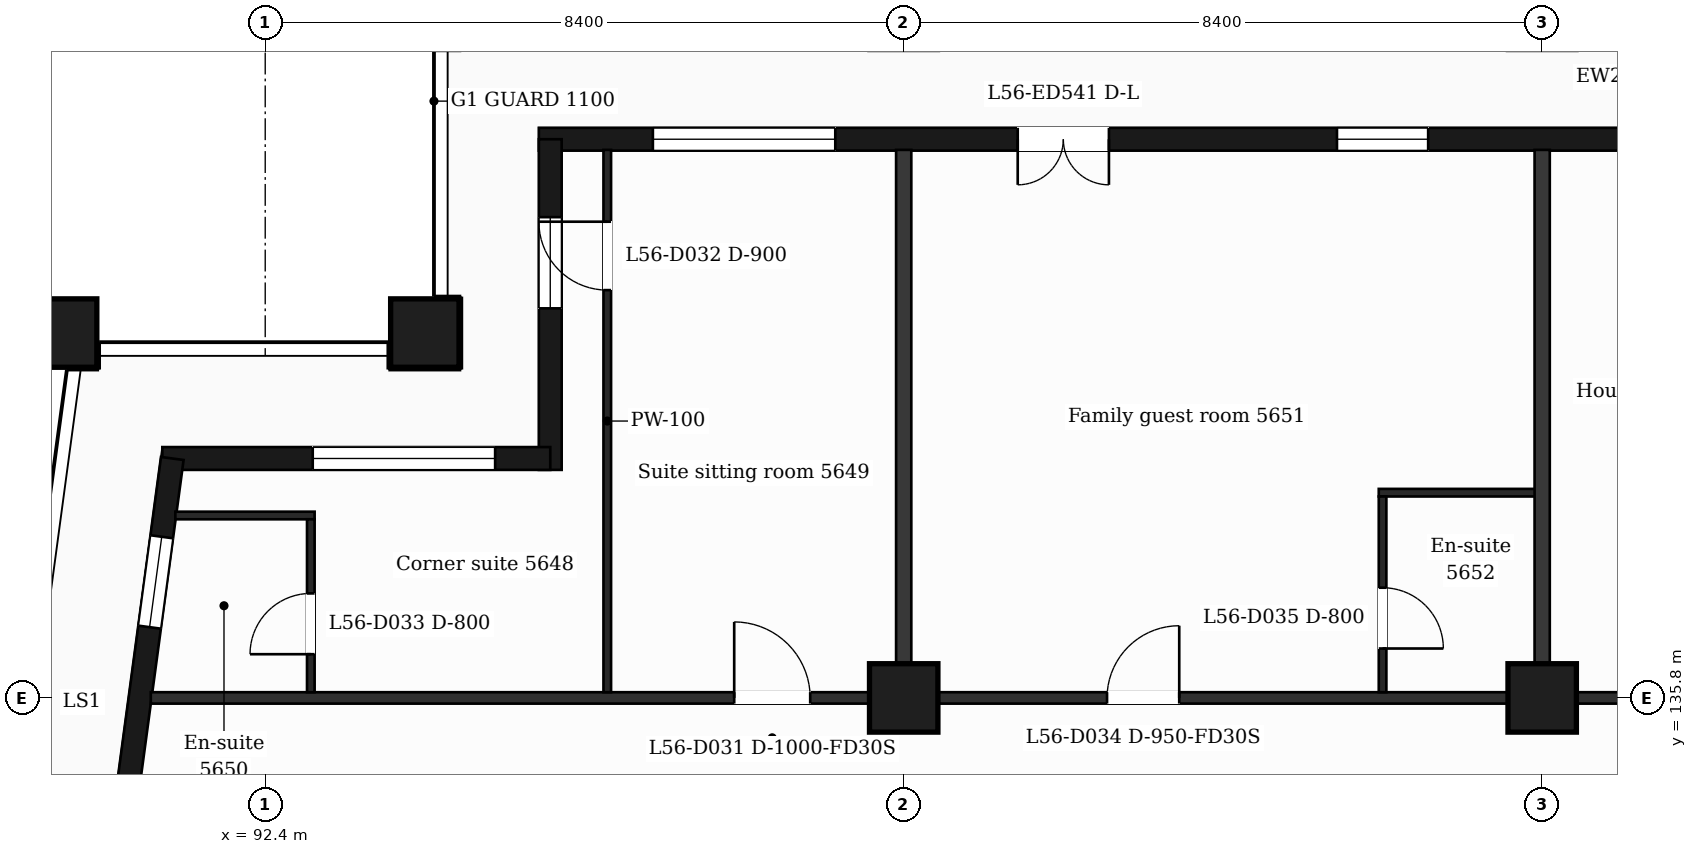
"""IFC4 building model, lengths in metres.
Left out: names, types, materials, properties, quantities, classifications, styles, units other than length and angle.
Written with IfcOpenShell. Run it as: python <this file> out.ifc"""

import sys

from ifc_helpers import new_model, si_unit, direction, frame, frame_2d, origin, origin_2d, place, context, subcontext, project, spatial, rectangle, extrude, element, fill, save


model = new_model("IFC4")
c1 = context("Model", 3, precision=1e-05, world=origin(), true_north=direction((0.0, 1.0)))
c2 = subcontext(c1, "Body", "Model", "MODEL_VIEW")
j1 = project(units=[si_unit("LENGTHUNIT", "METRE"), si_unit("PLANEANGLEUNIT", "RADIAN")], contexts=[c1])
p1 = place(None, origin())
s1 = spatial("IfcSite", under=j1, at=p1, CompositionType="ELEMENT")
p2 = place(p1, origin())
s2 = spatial("IfcBuilding", under=s1, at=p2, CompositionType="ELEMENT")
p3 = place(p2, frame((0.0, 0.0, 231.8)))
s3 = spatial("IfcBuildingStorey", under=s2, at=p3, CompositionType="ELEMENT", Elevation=231.8)
for number, where, z_axis, x_axis in (
    (1, (94.5, 140.6, 0.0), (0.0, 0.0, 1.0), (1.0, 0.0, 0.0)),
    (2, (89.735, 140.6, 0.0), (0.0, 0.0, 1.0), (1.0, 0.0, 0.0)),
    (3, (100.8, 135.8, 0.0), (0.0, 0.0, 1.0), (1.0, 0.0, 0.0)),
    (4, (109.2, 135.8, 0.0), (0.0, 0.0, 1.0), (1.0, 0.0, 0.0)),
):
    element("IfcColumn", number, at=place(p3, frame(where, z_axis=z_axis, x_axis=x_axis)), inside=s3, PredefinedType="COLUMN", context=c2, shape_type="SweptSolid", body=[
        extrude(rectangle(XDim=0.9, YDim=0.9, at=origin_2d()), origin(), (0.0, 0.0, 1.0), 3.7),
    ])
p4 = place(p3, frame((110.4, 143.15, 0.0), z_axis=(0.0, 0.0, 1.0), x_axis=(-1.0, 0.0, 0.0)))
e5 = element("IfcWall", 5, at=p4, inside=s3, PredefinedType="SOLIDWALL", context=c2, shape_type="SweptSolid", body=[
    extrude(rectangle(XDim=14.4, YDim=0.3, at=frame_2d((7.2, 0.0))), origin(), (0.0, 0.0, 1.0), 3.38),
])
p5 = place(p4, frame((2.7, 0.0, 0.9)))
e6 = element("IfcOpeningElement", 6, at=p5, cuts=e5, PredefinedType="OPENING", context=c2, shape_type="SweptSolid", body=[
    extrude(rectangle(XDim=1.2, YDim=2.1, at=frame_2d((0.6, 1.05))), frame((0.0, 0.16, 0.0), z_axis=(0.0, -1.0, 0.0), x_axis=(1.0, 0.0, 0.0)), (0.0, 0.0, 1.0), 0.32),
])
p6 = place(p4, frame((6.9, 0.0, 0.0)))
e7 = element("IfcOpeningElement", 7, at=p6, cuts=e5, PredefinedType="OPENING", context=c2, shape_type="SweptSolid", body=[
    extrude(rectangle(XDim=1.2, YDim=2.4, at=frame_2d((0.6, 1.2))), frame((0.0, 0.16, 0.0), z_axis=(0.0, -1.0, 0.0), x_axis=(1.0, 0.0, 0.0)), (0.0, 0.0, 1.0), 0.32),
])
p7 = place(p4, frame((10.5, 0.0, 0.9)))
e8 = element("IfcOpeningElement", 8, at=p7, cuts=e5, PredefinedType="OPENING", context=c2, shape_type="SweptSolid", body=[
    extrude(rectangle(XDim=2.4, YDim=2.1, at=frame_2d((1.2, 1.05))), frame((0.0, 0.16, 0.0), z_axis=(0.0, -1.0, 0.0), x_axis=(1.0, 0.0, 0.0)), (0.0, 0.0, 1.0), 0.32),
])
p8 = place(p3, frame((96.15, 143.15, 0.0), z_axis=(0.0, 0.0, 1.0), x_axis=(0.0, -1.0, 0.0)))
e9 = element("IfcWall", 9, at=p8, inside=s3, PredefinedType="SOLIDWALL", context=c2, shape_type="SweptSolid", body=[
    extrude(rectangle(XDim=4.35, YDim=0.3, at=frame_2d((2.175, 0.0))), origin(), (0.0, 0.0, 1.0), 3.38),
])
p9 = place(p8, frame((1.025, 0.0, 0.9)))
e10 = element("IfcOpeningElement", 10, at=p9, cuts=e9, PredefinedType="OPENING", context=c2, shape_type="SweptSolid", body=[
    extrude(rectangle(XDim=1.2, YDim=2.1, at=frame_2d((0.6, 1.05))), frame((0.0, 0.16, 0.0), z_axis=(0.0, -1.0, 0.0), x_axis=(1.0, 0.0, 0.0)), (0.0, 0.0, 1.0), 0.32),
])
p10 = place(p3, frame((96.15, 138.95, 0.0), z_axis=(0.0, 0.0, 1.0), x_axis=(-1.0, 0.0, 0.0)))
e11 = element("IfcWall", 11, at=p10, inside=s3, PredefinedType="SOLIDWALL", context=c2, shape_type="SweptSolid", body=[
    extrude(rectangle(XDim=5.104, YDim=0.3, at=frame_2d((2.552, 0.0))), origin(), (0.0, 0.0, 1.0), 3.38),
])
p11 = place(p10, frame((0.725, 0.0, 0.9)))
e12 = element("IfcOpeningElement", 12, at=p11, cuts=e11, PredefinedType="OPENING", context=c2, shape_type="SweptSolid", body=[
    extrude(rectangle(XDim=2.4, YDim=2.1, at=frame_2d((1.2, 1.05))), frame((0.0, 0.16, 0.0), z_axis=(0.0, -1.0, 0.0), x_axis=(1.0, 0.0, 0.0)), (0.0, 0.0, 1.0), 0.32),
])
p12 = place(p3, frame((91.177, 138.95, 0.0), z_axis=(0.0, 0.0, 1.0), x_axis=(-0.133426664613, -0.991058689065, 0.0)))
e13 = element("IfcWall", 13, at=p12, inside=s3, PredefinedType="SOLIDWALL", context=c2, shape_type="SweptSolid", body=[
    extrude(rectangle(XDim=6.609, YDim=0.3, at=frame_2d((3.305, 0.0))), origin(), (0.0, 0.0, 1.0), 3.38),
])
p13 = place(p12, frame((1.039, 0.0, 0.9)))
e14 = element("IfcOpeningElement", 14, at=p13, cuts=e13, PredefinedType="OPENING", context=c2, shape_type="SweptSolid", body=[
    extrude(rectangle(XDim=1.2, YDim=2.1, at=frame_2d((0.6, 1.05))), frame((0.0, 0.16, 0.0), z_axis=(0.0, -1.0, 0.0), x_axis=(1.0, 0.0, 0.0)), (0.0, 0.0, 1.0), 0.32),
])
p14 = place(p12, frame((4.294, 0.0, 0.0)))
e15 = element("IfcOpeningElement", 15, at=p14, cuts=e13, PredefinedType="OPENING", context=c2, shape_type="SweptSolid", body=[
    extrude(rectangle(XDim=1.2, YDim=2.4, at=frame_2d((0.6, 1.2))), frame((0.0, 0.16, 0.0), z_axis=(0.0, -1.0, 0.0), x_axis=(1.0, 0.0, 0.0)), (0.0, 0.0, 1.0), 0.32),
])
p15 = place(p3, frame((90.895, 135.8, 0.0), z_axis=(0.0, 0.0, 1.0), x_axis=(1.0, 0.0, 0.0)))
e16 = element("IfcWall", 16, at=p15, inside=s3, PredefinedType="PARTITIONING", context=c2, shape_type="SweptSolid", body=[
    extrude(rectangle(XDim=45.011, YDim=0.15, at=frame_2d((22.505, 0.0))), origin(), (0.0, 0.0, 1.0), 3.38),
])
p16 = place(p15, frame((7.675, 0.0, 0.0)))
e17 = element("IfcOpeningElement", 17, at=p16, cuts=e16, PredefinedType="OPENING", context=c2, shape_type="SweptSolid", body=[
    extrude(rectangle(XDim=1.0, YDim=2.1, at=frame_2d((0.5, 1.05))), frame((0.0, 0.085, 0.0), z_axis=(0.0, -1.0, 0.0), x_axis=(1.0, 0.0, 0.0)), (0.0, 0.0, 1.0), 0.17),
])
p17 = place(p15, frame((12.58, 0.0, 0.0)))
e18 = element("IfcOpeningElement", 18, at=p17, cuts=e16, PredefinedType="OPENING", context=c2, shape_type="SweptSolid", body=[
    extrude(rectangle(XDim=0.95, YDim=2.1, at=frame_2d((0.475, 1.05))), frame((0.0, 0.085, 0.0), z_axis=(0.0, -1.0, 0.0), x_axis=(1.0, 0.0, 0.0)), (0.0, 0.0, 1.0), 0.17),
])
p18 = place(p15, frame((20.568, 0.0, 0.0)))
e19 = element("IfcOpeningElement", 19, at=p18, cuts=e16, PredefinedType="OPENING", context=c2, shape_type="SweptSolid", body=[
    extrude(rectangle(XDim=0.95, YDim=2.1, at=frame_2d((0.475, 1.05))), frame((0.0, 0.085, 0.0), z_axis=(0.0, -1.0, 0.0), x_axis=(1.0, 0.0, 0.0)), (0.0, 0.0, 1.0), 0.17),
])
p19 = place(p15, frame((24.865, 0.0, 0.0)))
e20 = element("IfcOpeningElement", 20, at=p19, cuts=e16, PredefinedType="OPENING", context=c2, shape_type="SweptSolid", body=[
    extrude(rectangle(XDim=1.0, YDim=2.1, at=frame_2d((0.5, 1.05))), frame((0.0, 0.085, 0.0), z_axis=(0.0, -1.0, 0.0), x_axis=(1.0, 0.0, 0.0)), (0.0, 0.0, 1.0), 0.17),
])
p20 = place(p15, frame((39.814, 0.0, 0.0)))
e21 = element("IfcOpeningElement", 21, at=p20, cuts=e16, PredefinedType="OPENING", context=c2, shape_type="SweptSolid", body=[
    extrude(rectangle(XDim=0.95, YDim=2.1, at=frame_2d((0.475, 1.05))), frame((0.0, 0.085, 0.0), z_axis=(0.0, -1.0, 0.0), x_axis=(1.0, 0.0, 0.0)), (0.0, 0.0, 1.0), 0.17),
])
p21 = place(p3, frame((91.218, 138.2, 0.0), z_axis=(0.0, 0.0, 1.0), x_axis=(1.0, 0.0, 0.0)))
e22 = element("IfcWall", 22, at=p21, inside=s3, PredefinedType="PARTITIONING", context=c2, shape_type="SweptSolid", body=[
    extrude(rectangle(XDim=1.832, YDim=0.1, at=frame_2d((0.916, 0.0))), origin(), (0.0, 0.0, 1.0), 3.38),
])
p22 = place(p3, frame((107.05, 138.5, 0.0), z_axis=(0.0, 0.0, 1.0), x_axis=(1.0, 0.0, 0.0)))
e23 = element("IfcWall", 23, at=p22, inside=s3, PredefinedType="PARTITIONING", context=c2, shape_type="SweptSolid", body=[
    extrude(rectangle(XDim=2.15, YDim=0.1, at=frame_2d((1.075, 0.0))), origin(), (0.0, 0.0, 1.0), 3.38),
])
p23 = place(p3, frame((93.0, 135.875, 0.0), z_axis=(0.0, 0.0, 1.0), x_axis=(0.0, 1.0, 0.0)))
e24 = element("IfcWall", 24, at=p23, inside=s3, PredefinedType="PARTITIONING", context=c2, shape_type="SweptSolid", body=[
    extrude(rectangle(XDim=2.275, YDim=0.1, at=frame_2d((1.137, 0.0))), origin(), (0.0, 0.0, 1.0), 3.38),
])
p24 = place(p23, frame((0.5, 0.0, 0.0)))
e25 = element("IfcOpeningElement", 25, at=p24, cuts=e24, PredefinedType="OPENING", context=c2, shape_type="SweptSolid", body=[
    extrude(rectangle(XDim=0.8, YDim=2.1, at=frame_2d((0.4, 1.05))), frame((0.0, 0.06, 0.0), z_axis=(0.0, -1.0, 0.0), x_axis=(1.0, 0.0, 0.0)), (0.0, 0.0, 1.0), 0.12),
])
p25 = place(p3, frame((96.9, 135.875, 0.0), z_axis=(0.0, 0.0, 1.0), x_axis=(0.0, 1.0, 0.0)))
e26 = element("IfcWall", 26, at=p25, inside=s3, PredefinedType="PARTITIONING", context=c2, shape_type="SweptSolid", body=[
    extrude(rectangle(XDim=7.135, YDim=0.1, at=frame_2d((3.567, 0.0))), origin(), (0.0, 0.0, 1.0), 3.38),
])
p26 = place(p25, frame((5.29, 0.0, 0.0)))
e27 = element("IfcOpeningElement", 27, at=p26, cuts=e26, PredefinedType="OPENING", context=c2, shape_type="SweptSolid", body=[
    extrude(rectangle(XDim=0.9, YDim=2.1, at=frame_2d((0.45, 1.05))), frame((0.0, 0.06, 0.0), z_axis=(0.0, -1.0, 0.0), x_axis=(1.0, 0.0, 0.0)), (0.0, 0.0, 1.0), 0.12),
])
p27 = place(p3, frame((100.8, 135.875, 0.0), z_axis=(0.0, 0.0, 1.0), x_axis=(0.0, 1.0, 0.0)))
e28 = element("IfcWall", 28, at=p27, inside=s3, PredefinedType="PARTITIONING", context=c2, shape_type="SweptSolid", body=[
    extrude(rectangle(XDim=7.135, YDim=0.2, at=frame_2d((3.567, 0.0))), origin(), (0.0, 0.0, 1.0), 3.38),
])
p28 = place(p3, frame((107.1, 135.875, 0.0), z_axis=(0.0, 0.0, 1.0), x_axis=(0.0, 1.0, 0.0)))
e29 = element("IfcWall", 29, at=p28, inside=s3, PredefinedType="PARTITIONING", context=c2, shape_type="SweptSolid", body=[
    extrude(rectangle(XDim=2.575, YDim=0.1, at=frame_2d((1.288, 0.0))), origin(), (0.0, 0.0, 1.0), 3.38),
])
p29 = place(p28, frame((0.575, 0.0, 0.0)))
e30 = element("IfcOpeningElement", 30, at=p29, cuts=e29, PredefinedType="OPENING", context=c2, shape_type="SweptSolid", body=[
    extrude(rectangle(XDim=0.8, YDim=2.1, at=frame_2d((0.4, 1.05))), frame((0.0, 0.06, 0.0), z_axis=(0.0, -1.0, 0.0), x_axis=(1.0, 0.0, 0.0)), (0.0, 0.0, 1.0), 0.12),
])
p30 = place(p3, frame((109.2, 135.875, 0.0), z_axis=(0.0, 0.0, 1.0), x_axis=(0.0, 1.0, 0.0)))
e31 = element("IfcWall", 31, at=p30, inside=s3, PredefinedType="PARTITIONING", context=c2, shape_type="SweptSolid", body=[
    extrude(rectangle(XDim=7.135, YDim=0.2, at=frame_2d((3.567, 0.0))), origin(), (0.0, 0.0, 1.0), 3.38),
])
p31 = place(p5, origin())
e32 = element("IfcWindow", 32, at=p31, inside=s3, PartitioningType="SINGLE_PANEL", PredefinedType="WINDOW", context=c2, shape_type="SweptSolid", body=[
    extrude(rectangle(XDim=1.2, YDim=2.1, at=frame_2d((0.6, 1.05))), frame((0.0, 0.03, 0.0), z_axis=(0.0, -1.0, 0.0), x_axis=(1.0, 0.0, 0.0)), (0.0, 0.0, 1.0), 0.06),
])
fill(e6, e32)
p32 = place(p6, origin())
e33 = element("IfcDoor", 33, at=p32, inside=s3, OperationType="DOUBLE_DOOR_SINGLE_SWING", PredefinedType="DOOR", context=c2, shape_type="SweptSolid", body=[
    extrude(rectangle(XDim=1.2, YDim=2.4, at=frame_2d((0.6, 1.2))), frame((0.0, 0.025, 0.0), z_axis=(0.0, -1.0, 0.0), x_axis=(1.0, 0.0, 0.0)), (0.0, 0.0, 1.0), 0.05),
])
fill(e7, e33)
p33 = place(p7, origin())
e34 = element("IfcWindow", 34, at=p33, inside=s3, PartitioningType="SINGLE_PANEL", PredefinedType="WINDOW", context=c2, shape_type="SweptSolid", body=[
    extrude(rectangle(XDim=2.4, YDim=2.1, at=frame_2d((1.2, 1.05))), frame((0.0, 0.03, 0.0), z_axis=(0.0, -1.0, 0.0), x_axis=(1.0, 0.0, 0.0)), (0.0, 0.0, 1.0), 0.06),
])
fill(e8, e34)
p34 = place(p9, origin())
e35 = element("IfcWindow", 35, at=p34, inside=s3, PartitioningType="SINGLE_PANEL", PredefinedType="WINDOW", context=c2, shape_type="SweptSolid", body=[
    extrude(rectangle(XDim=1.2, YDim=2.1, at=frame_2d((0.6, 1.05))), frame((0.0, 0.03, 0.0), z_axis=(0.0, -1.0, 0.0), x_axis=(1.0, 0.0, 0.0)), (0.0, 0.0, 1.0), 0.06),
])
fill(e10, e35)
p35 = place(p11, origin())
e36 = element("IfcWindow", 36, at=p35, inside=s3, PartitioningType="SINGLE_PANEL", PredefinedType="WINDOW", context=c2, shape_type="SweptSolid", body=[
    extrude(rectangle(XDim=2.4, YDim=2.1, at=frame_2d((1.2, 1.05))), frame((0.0, 0.03, 0.0), z_axis=(0.0, -1.0, 0.0), x_axis=(1.0, 0.0, 0.0)), (0.0, 0.0, 1.0), 0.06),
])
fill(e12, e36)
p36 = place(p13, origin())
e37 = element("IfcWindow", 37, at=p36, inside=s3, PartitioningType="SINGLE_PANEL", PredefinedType="WINDOW", context=c2, shape_type="SweptSolid", body=[
    extrude(rectangle(XDim=1.2, YDim=2.1, at=frame_2d((0.6, 1.05))), frame((0.0, 0.03, 0.0), z_axis=(0.0, -1.0, 0.0), x_axis=(1.0, 0.0, 0.0)), (0.0, 0.0, 1.0), 0.06),
])
fill(e14, e37)
p37 = place(p16, origin())
e38 = element("IfcDoor", 38, at=p37, inside=s3, OperationType="SINGLE_SWING_LEFT", PredefinedType="DOOR", context=c2, shape_type="SweptSolid", body=[
    extrude(rectangle(XDim=1.0, YDim=2.1, at=frame_2d((0.5, 1.05))), frame((0.0, 0.025, 0.0), z_axis=(0.0, -1.0, 0.0), x_axis=(1.0, 0.0, 0.0)), (0.0, 0.0, 1.0), 0.05),
])
fill(e17, e38)
p38 = place(p26, origin())
e39 = element("IfcDoor", 39, at=p38, inside=s3, OperationType="SINGLE_SWING_RIGHT", PredefinedType="DOOR", context=c2, shape_type="SweptSolid", body=[
    extrude(rectangle(XDim=0.9, YDim=2.1, at=frame_2d((0.45, 1.05))), frame((0.0, 0.025, 0.0), z_axis=(0.0, -1.0, 0.0), x_axis=(1.0, 0.0, 0.0)), (0.0, 0.0, 1.0), 0.05),
])
fill(e27, e39)
p39 = place(p24, origin())
e40 = element("IfcDoor", 40, at=p39, inside=s3, OperationType="SINGLE_SWING_LEFT", PredefinedType="DOOR", context=c2, shape_type="SweptSolid", body=[
    extrude(rectangle(XDim=0.8, YDim=2.1, at=frame_2d((0.4, 1.05))), frame((0.0, 0.025, 0.0), z_axis=(0.0, -1.0, 0.0), x_axis=(1.0, 0.0, 0.0)), (0.0, 0.0, 1.0), 0.05),
])
fill(e25, e40)
p40 = place(p17, origin())
e41 = element("IfcDoor", 41, at=p40, inside=s3, OperationType="SINGLE_SWING_RIGHT", PredefinedType="DOOR", context=c2, shape_type="SweptSolid", body=[
    extrude(rectangle(XDim=0.95, YDim=2.1, at=frame_2d((0.475, 1.05))), frame((0.0, 0.025, 0.0), z_axis=(0.0, -1.0, 0.0), x_axis=(1.0, 0.0, 0.0)), (0.0, 0.0, 1.0), 0.05),
])
fill(e18, e41)
p41 = place(p29, origin())
e42 = element("IfcDoor", 42, at=p41, inside=s3, OperationType="SINGLE_SWING_LEFT", PredefinedType="DOOR", context=c2, shape_type="SweptSolid", body=[
    extrude(rectangle(XDim=0.8, YDim=2.1, at=frame_2d((0.4, 1.05))), frame((0.0, 0.025, 0.0), z_axis=(0.0, -1.0, 0.0), x_axis=(1.0, 0.0, 0.0)), (0.0, 0.0, 1.0), 0.05),
])
fill(e30, e42)
save(model, sys.argv[1])
